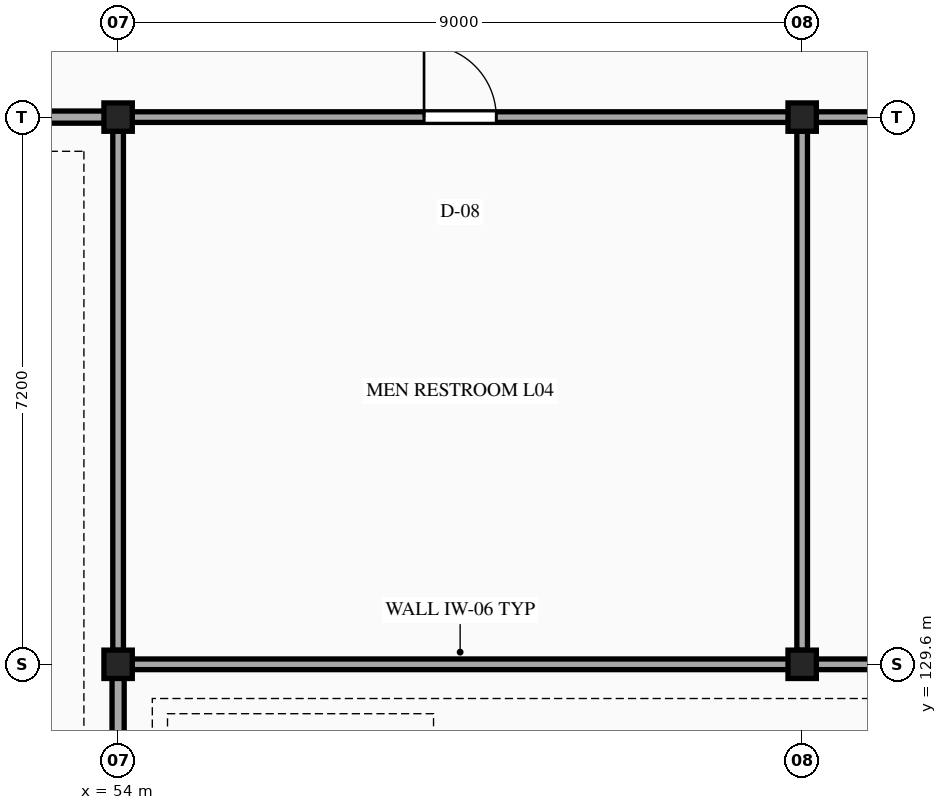
"""IFC4 building model, lengths in metres.
Left out: names, types, materials, properties, quantities, classifications, styles, units other than length and angle.
Written with IfcOpenShell. Run it as: python <this file> out.ifc"""

import sys

from ifc_helpers import new_model, si_unit, direction, frame, frame_2d, origin, origin_2d, place, context, subcontext, project, spatial, rectangle, i_section, extrude, element, fill, save


model = new_model("IFC4")
c1 = context("Model", 3, precision=1e-05, world=origin(), true_north=direction((0.0, 1.0)))
c2 = subcontext(c1, "Body", "Model", "MODEL_VIEW")
j1 = project(units=[si_unit("LENGTHUNIT", "METRE"), si_unit("PLANEANGLEUNIT", "RADIAN")], contexts=[c1])
p1 = place(None, origin())
s1 = spatial("IfcSite", under=j1, at=p1, CompositionType="ELEMENT")
p2 = place(p1, origin())
s2 = spatial("IfcBuilding", under=s1, at=p2, CompositionType="ELEMENT")
p3 = place(p2, frame((0.0, 0.0, 19.8)))
s3 = spatial("IfcBuildingStorey", under=s2, at=p3, CompositionType="ELEMENT", Elevation=19.8)
for number, where, z_axis, x_axis in (
    (1, (54.0, 129.6, 0.0), (0.0, 0.0, 1.0), (1.0, 0.0, 0.0)),
    (2, (54.0, 136.8, 0.0), (0.0, 0.0, 1.0), (1.0, 0.0, 0.0)),
    (3, (63.0, 129.6, 0.0), (0.0, 0.0, 1.0), (1.0, 0.0, 0.0)),
    (4, (63.0, 136.8, 0.0), (0.0, 0.0, 1.0), (1.0, 0.0, 0.0)),
):
    element("IfcColumn", number, at=place(p3, frame(where, z_axis=z_axis, x_axis=x_axis)), inside=s3, PredefinedType="COLUMN", context=c2, shape_type="SweptSolid", body=[
        extrude(i_section(OverallWidth=0.373, OverallDepth=0.373, WebThickness=0.016, FlangeThickness=0.026, at=origin_2d()), origin(), (0.0, 0.0, 1.0), 4.5),
    ])
p4 = place(p3, frame((54.006, 129.6, 0.0), z_axis=(0.0, 0.0, 1.0), x_axis=(1.0, 0.0, 0.0)))
e5 = element("IfcWall", 5, at=p4, inside=s3, PredefinedType="PARTITIONING", context=c2, shape_type="SweptSolid", body=[
    extrude(rectangle(XDim=8.988, YDim=0.14, at=frame_2d((4.494, 0.0))), origin(), (0.0, 0.0, 1.0), 3.648),
])
p5 = place(p3, frame((63.006, 129.6, 0.0), z_axis=(0.0, 0.0, 1.0), x_axis=(1.0, 0.0, 0.0)))
e6 = element("IfcWall", 6, at=p5, inside=s3, PredefinedType="PARTITIONING", context=c2, shape_type="SweptSolid", body=[
    extrude(rectangle(XDim=8.989, YDim=0.14, at=frame_2d((4.495, 0.0))), origin(), (0.0, 0.0, 1.0), 3.588),
])
p6 = place(p3, frame((45.006, 136.8, 0.0), z_axis=(0.0, 0.0, 1.0), x_axis=(1.0, 0.0, 0.0)))
e7 = element("IfcWall", 7, at=p6, inside=s3, PredefinedType="PARTITIONING", context=c2, shape_type="SweptSolid", body=[
    extrude(rectangle(XDim=8.988, YDim=0.16, at=frame_2d((4.494, 0.0))), origin(), (0.0, 0.0, 1.0), 3.648),
])
p7 = place(p6, frame((3.594, 0.0, 0.0)))
e8 = element("IfcOpeningElement", 8, at=p7, cuts=e7, PredefinedType="OPENING", context=c2, shape_type="SweptSolid", body=[
    extrude(rectangle(XDim=1.8, YDim=2.25, at=frame_2d((0.9, 1.125))), frame((0.0, 0.09, 0.0), z_axis=(0.0, -1.0, 0.0), x_axis=(1.0, 0.0, 0.0)), (0.0, 0.0, 1.0), 0.18),
])
p8 = place(p3, frame((54.006, 136.8, 0.0), z_axis=(0.0, 0.0, 1.0), x_axis=(1.0, 0.0, 0.0)))
e9 = element("IfcWall", 9, at=p8, inside=s3, PredefinedType="PARTITIONING", context=c2, shape_type="SweptSolid", body=[
    extrude(rectangle(XDim=8.988, YDim=0.14, at=frame_2d((4.494, 0.0))), origin(), (0.0, 0.0, 1.0), 3.648),
])
p9 = place(p8, frame((4.019, 0.0, 0.0)))
e10 = element("IfcOpeningElement", 10, at=p9, cuts=e9, PredefinedType="OPENING", context=c2, shape_type="SweptSolid", body=[
    extrude(rectangle(XDim=0.95, YDim=2.1, at=frame_2d((0.475, 1.05))), frame((0.0, 0.08, 0.0), z_axis=(0.0, -1.0, 0.0), x_axis=(1.0, 0.0, 0.0)), (0.0, 0.0, 1.0), 0.16),
])
p10 = place(p3, frame((63.006, 136.8, 0.0), z_axis=(0.0, 0.0, 1.0), x_axis=(1.0, 0.0, 0.0)))
e11 = element("IfcWall", 11, at=p10, inside=s3, PredefinedType="PARTITIONING", context=c2, shape_type="SweptSolid", body=[
    extrude(rectangle(XDim=8.989, YDim=0.14, at=frame_2d((4.495, 0.0))), origin(), (0.0, 0.0, 1.0), 3.648),
])
p11 = place(p10, frame((4.019, 0.0, 0.0)))
e12 = element("IfcOpeningElement", 12, at=p11, cuts=e11, PredefinedType="OPENING", context=c2, shape_type="SweptSolid", body=[
    extrude(rectangle(XDim=0.95, YDim=2.1, at=frame_2d((0.475, 1.05))), frame((0.0, 0.08, 0.0), z_axis=(0.0, -1.0, 0.0), x_axis=(1.0, 0.0, 0.0)), (0.0, 0.0, 1.0), 0.16),
])
p12 = place(p3, frame((54.0, 122.584, 0.0), z_axis=(0.0, 0.0, 1.0), x_axis=(0.0, 1.0, 0.0)))
e13 = element("IfcWall", 13, at=p12, inside=s3, PredefinedType="PARTITIONING", context=c2, shape_type="SweptSolid", body=[
    extrude(rectangle(XDim=6.831, YDim=0.16, at=frame_2d((3.416, 0.0))), origin(), (0.0, 0.0, 1.0), 3.648),
])
for number, where, z_axis, x_axis in (
    (14, (54.0, 129.784, 0.0), (0.0, 0.0, 1.0), (0.0, 1.0, 0.0)),
    (15, (63.0, 129.784, 0.0), (0.0, 0.0, 1.0), (0.0, 1.0, 0.0)),
):
    element("IfcWall", number, at=place(p3, frame(where, z_axis=z_axis, x_axis=x_axis)), inside=s3, PredefinedType="PARTITIONING", context=c2, shape_type="SweptSolid", body=[
        extrude(rectangle(XDim=6.831, YDim=0.14, at=frame_2d((3.416, 0.0))), origin(), (0.0, 0.0, 1.0), 3.648),
    ])
p13 = place(p9, origin())
e16 = element("IfcDoor", 16, at=p13, inside=s3, OperationType="SINGLE_SWING_LEFT", PredefinedType="DOOR", context=c2, shape_type="SweptSolid", body=[
    extrude(rectangle(XDim=0.95, YDim=2.1, at=frame_2d((0.475, 1.05))), frame((0.0, 0.025, 0.0), z_axis=(0.0, -1.0, 0.0), x_axis=(1.0, 0.0, 0.0)), (0.0, 0.0, 1.0), 0.05),
])
fill(e10, e16)
save(model, sys.argv[1])
